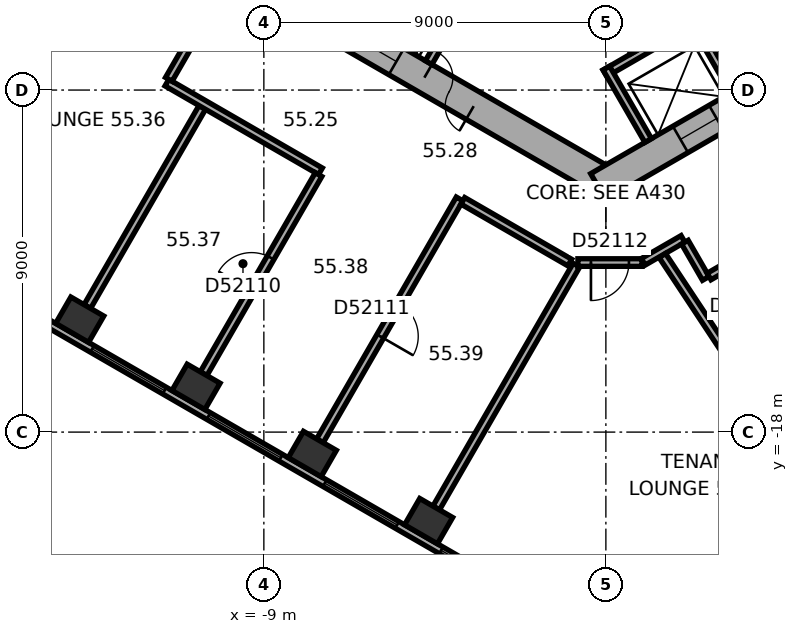
"""IFC4 building model, lengths in metres.
Left out: names, types, materials, properties, quantities, classifications, styles, units other than length and angle.
Written with IfcOpenShell. Run it as: python <this file> out.ifc"""

import sys

from ifc_helpers import new_model, si_unit, direction, frame, frame_2d, origin, origin_2d, place, context, subcontext, project, spatial, rectangle, extrude, element, fill, save


model = new_model("IFC4")
c1 = context("Model", 3, precision=1e-05, world=origin(), true_north=direction((0.0, 1.0)))
c2 = subcontext(c1, "Body", "Model", "MODEL_VIEW")
j1 = project(units=[si_unit("LENGTHUNIT", "METRE"), si_unit("PLANEANGLEUNIT", "RADIAN")], contexts=[c1])
p1 = place(None, origin())
s1 = spatial("IfcSite", under=j1, at=p1, CompositionType="ELEMENT")
p2 = place(p1, origin())
s2 = spatial("IfcBuilding", under=s1, at=p2, CompositionType="ELEMENT")
p3 = place(p2, frame((0.0, 0.0, 225.4)))
s3 = spatial("IfcBuildingStorey", under=s2, at=p3, CompositionType="ELEMENT", Elevation=225.4)
for number, where, z_axis, x_axis in (
    (1, (-13.845, -15.042, 0.0), (0.0, 0.0, 1.0), (0.866, -0.5, 0.0)),
    (2, (-10.785, -16.809, 0.0), (0.0, 0.0, 1.0), (0.866, -0.5, 0.0)),
    (3, (-7.725, -18.576, 0.0), (0.0, 0.0, 1.0), (0.866, -0.5, 0.0)),
    (4, (-4.665, -20.343, 0.0), (0.0, 0.0, 1.0), (0.866, -0.5, 0.0)),
):
    element("IfcColumn", number, at=place(p3, frame(where, z_axis=z_axis, x_axis=x_axis)), inside=s3, PredefinedType="COLUMN", context=c2, shape_type="SweptSolid", body=[
        extrude(rectangle(XDim=1.0, YDim=0.8, at=origin_2d()), origin(), (0.0, 0.0, 1.0), 3.7),
    ])
p4 = place(p3, frame((-10.1, -5.6, 0.0), z_axis=(0.0, 0.0, 1.0), x_axis=(0.866023897231, -0.500002609418, 0.0)))
e5 = element("IfcWall", 5, at=p4, inside=s3, PredefinedType="SHEAR", context=c2, shape_type="SweptSolid", body=[
    extrude(rectangle(XDim=11.894, YDim=0.8, at=frame_2d((5.947, 0.0))), origin(), (0.0, 0.0, 1.0), 3.7),
])
p5 = place(p4, frame((6.147, 0.0, 0.0)))
e6 = element("IfcOpeningElement", 6, at=p5, cuts=e5, PredefinedType="OPENING", context=c2, shape_type="SweptSolid", body=[
    extrude(rectangle(XDim=1.5, YDim=2.1, at=frame_2d((0.75, 1.05))), frame((0.0, 0.41, 0.0), z_axis=(0.0, -1.0, 0.0), x_axis=(1.0, 0.0, 0.0)), (0.0, 0.0, 1.0), 0.82),
])
p6 = place(p4, frame((1.597, 0.0, 0.0)))
e7 = element("IfcOpeningElement", 7, at=p6, cuts=e5, PredefinedType="OPENING", context=c2, shape_type="SweptSolid", body=[
    extrude(rectangle(XDim=1.1, YDim=2.1, at=frame_2d((0.55, 1.05))), frame((0.0, 0.41, 0.0), z_axis=(0.0, -1.0, 0.0), x_axis=(1.0, 0.0, 0.0)), (0.0, 0.0, 1.0), 0.82),
])
p7 = place(p4, frame((4.197, 0.0, 0.0)))
e8 = element("IfcOpeningElement", 8, at=p7, cuts=e5, PredefinedType="OPENING", context=c2, shape_type="SweptSolid", body=[
    extrude(rectangle(XDim=1.1, YDim=2.1, at=frame_2d((0.55, 1.05))), frame((0.0, 0.41, 0.0), z_axis=(0.0, -1.0, 0.0), x_axis=(1.0, 0.0, 0.0)), (0.0, 0.0, 1.0), 0.82),
])
p8 = place(p3, frame((-0.2, -11.547, 0.0), z_axis=(0.0, 0.0, 1.0), x_axis=(0.866023897231, 0.500002609418, 0.0)))
e9 = element("IfcWall", 9, at=p8, inside=s3, PredefinedType="SHEAR", context=c2, shape_type="SweptSolid", body=[
    extrude(rectangle(XDim=11.894, YDim=0.8, at=frame_2d((5.947, 0.0))), origin(), (0.0, 0.0, 1.0), 3.7),
])
p9 = place(p8, frame((2.497, 0.0, 0.0)))
e10 = element("IfcOpeningElement", 10, at=p9, cuts=e9, PredefinedType="OPENING", context=c2, shape_type="SweptSolid", body=[
    extrude(rectangle(XDim=1.1, YDim=2.1, at=frame_2d((0.55, 1.05))), frame((0.0, 0.41, 0.0), z_axis=(0.0, -1.0, 0.0), x_axis=(1.0, 0.0, 0.0)), (0.0, 0.0, 1.0), 0.82),
])
p10 = place(p8, frame((5.097, 0.0, 0.0)))
e11 = element("IfcOpeningElement", 11, at=p10, cuts=e9, PredefinedType="OPENING", context=c2, shape_type="SweptSolid", body=[
    extrude(rectangle(XDim=1.1, YDim=2.1, at=frame_2d((0.55, 1.05))), frame((0.0, 0.41, 0.0), z_axis=(0.0, -1.0, 0.0), x_axis=(1.0, 0.0, 0.0)), (0.0, 0.0, 1.0), 0.82),
])
p11 = place(p8, frame((7.697, 0.0, 0.0)))
e12 = element("IfcOpeningElement", 12, at=p11, cuts=e9, PredefinedType="OPENING", context=c2, shape_type="SweptSolid", body=[
    extrude(rectangle(XDim=1.1, YDim=2.1, at=frame_2d((0.55, 1.05))), frame((0.0, 0.41, 0.0), z_axis=(0.0, -1.0, 0.0), x_axis=(1.0, 0.0, 0.0)), (0.0, 0.0, 1.0), 0.82),
])
p12 = place(p3, frame((-17.664, -13.415, 0.0), z_axis=(0.0, 0.0, 1.0), x_axis=(0.866026555358, -0.49999800541, 0.0)))
e13 = element("IfcWall", 13, at=p12, inside=s3, PredefinedType="STANDARD", context=c2, shape_type="SweptSolid", body=[
    extrude(rectangle(XDim=18.841, YDim=0.2, at=frame_2d((9.421, 0.0))), origin(), (0.0, 0.0, 1.0), 3.7),
])
p13 = place(p12, frame((1.254, 0.0, 0.9)))
e14 = element("IfcOpeningElement", 14, at=p13, cuts=e13, PredefinedType="OPENING", context=c2, shape_type="SweptSolid", body=[
    extrude(rectangle(XDim=2.2, YDim=2.0, at=frame_2d((1.1, 1.0))), frame((0.0, 0.11, 0.0), z_axis=(0.0, -1.0, 0.0), x_axis=(1.0, 0.0, 0.0)), (0.0, 0.0, 1.0), 0.22),
])
p14 = place(p12, frame((4.788, 0.0, 0.9)))
e15 = element("IfcOpeningElement", 15, at=p14, cuts=e13, PredefinedType="OPENING", context=c2, shape_type="SweptSolid", body=[
    extrude(rectangle(XDim=2.2, YDim=2.0, at=frame_2d((1.1, 1.0))), frame((0.0, 0.11, 0.0), z_axis=(0.0, -1.0, 0.0), x_axis=(1.0, 0.0, 0.0)), (0.0, 0.0, 1.0), 0.22),
])
p15 = place(p12, frame((8.322, 0.0, 0.9)))
e16 = element("IfcOpeningElement", 16, at=p15, cuts=e13, PredefinedType="OPENING", context=c2, shape_type="SweptSolid", body=[
    extrude(rectangle(XDim=2.2, YDim=2.0, at=frame_2d((1.1, 1.0))), frame((0.0, 0.11, 0.0), z_axis=(0.0, -1.0, 0.0), x_axis=(1.0, 0.0, 0.0)), (0.0, 0.0, 1.0), 0.22),
])
p16 = place(p12, frame((11.855, 0.0, 0.9)))
e17 = element("IfcOpeningElement", 17, at=p16, cuts=e13, PredefinedType="OPENING", context=c2, shape_type="SweptSolid", body=[
    extrude(rectangle(XDim=2.2, YDim=2.0, at=frame_2d((1.1, 1.0))), frame((0.0, 0.11, 0.0), z_axis=(0.0, -1.0, 0.0), x_axis=(1.0, 0.0, 0.0)), (0.0, 0.0, 1.0), 0.22),
])
p17 = place(p12, frame((15.389, 0.0, 0.9)))
e18 = element("IfcOpeningElement", 18, at=p17, cuts=e13, PredefinedType="OPENING", context=c2, shape_type="SweptSolid", body=[
    extrude(rectangle(XDim=2.2, YDim=2.0, at=frame_2d((1.1, 1.0))), frame((0.0, 0.11, 0.0), z_axis=(0.0, -1.0, 0.0), x_axis=(1.0, 0.0, 0.0)), (0.0, 0.0, 1.0), 0.22),
])
p18 = place(p3, frame((2.739, -22.711, 0.0), z_axis=(0.0, 0.0, 1.0), x_axis=(0.833885723098, 0.551937134838, 0.0)))
e19 = element("IfcWall", 19, at=p18, inside=s3, PredefinedType="STANDARD", context=c2, shape_type="SweptSolid", body=[
    extrude(rectangle(XDim=18.841, YDim=0.2, at=frame_2d((9.421, 0.0))), origin(), (0.0, 0.0, 1.0), 3.7),
])
p19 = place(p18, frame((1.252, 0.0, 0.9)))
e20 = element("IfcOpeningElement", 20, at=p19, cuts=e19, PredefinedType="OPENING", context=c2, shape_type="SweptSolid", body=[
    extrude(rectangle(XDim=2.2, YDim=2.0, at=frame_2d((1.1, 1.0))), frame((0.0, 0.11, 0.0), z_axis=(0.0, -1.0, 0.0), x_axis=(1.0, 0.0, 0.0)), (0.0, 0.0, 1.0), 0.22),
])
p20 = place(p18, frame((4.786, 0.0, 0.9)))
e21 = element("IfcOpeningElement", 21, at=p20, cuts=e19, PredefinedType="OPENING", context=c2, shape_type="SweptSolid", body=[
    extrude(rectangle(XDim=2.2, YDim=2.0, at=frame_2d((1.1, 1.0))), frame((0.0, 0.11, 0.0), z_axis=(0.0, -1.0, 0.0), x_axis=(1.0, 0.0, 0.0)), (0.0, 0.0, 1.0), 0.22),
])
p21 = place(p18, frame((8.32, 0.0, 0.9)))
e22 = element("IfcOpeningElement", 22, at=p21, cuts=e19, PredefinedType="OPENING", context=c2, shape_type="SweptSolid", body=[
    extrude(rectangle(XDim=2.2, YDim=2.0, at=frame_2d((1.1, 1.0))), frame((0.0, 0.11, 0.0), z_axis=(0.0, -1.0, 0.0), x_axis=(1.0, 0.0, 0.0)), (0.0, 0.0, 1.0), 0.22),
])
p22 = place(p18, frame((11.854, 0.0, 0.9)))
e23 = element("IfcOpeningElement", 23, at=p22, cuts=e19, PredefinedType="OPENING", context=c2, shape_type="SweptSolid", body=[
    extrude(rectangle(XDim=2.2, YDim=2.0, at=frame_2d((1.1, 1.0))), frame((0.0, 0.11, 0.0), z_axis=(0.0, -1.0, 0.0), x_axis=(1.0, 0.0, 0.0)), (0.0, 0.0, 1.0), 0.22),
])
p23 = place(p18, frame((15.387, 0.0, 0.9)))
e24 = element("IfcOpeningElement", 24, at=p23, cuts=e19, PredefinedType="OPENING", context=c2, shape_type="SweptSolid", body=[
    extrude(rectangle(XDim=2.2, YDim=2.0, at=frame_2d((1.1, 1.0))), frame((0.0, 0.11, 0.0), z_axis=(0.0, -1.0, 0.0), x_axis=(1.0, 0.0, 0.0)), (0.0, 0.0, 1.0), 0.22),
])
p24 = place(p3, frame((-3.563, -6.372, 0.0), z_axis=(0.0, 0.0, 1.0), x_axis=(-0.499994660107, -0.866028486751, 0.0)))
e25 = element("IfcWall", 25, at=p24, inside=s3, PredefinedType="PARTITIONING", context=c2, shape_type="SweptSolid", body=[
    extrude(rectangle(XDim=2.2, YDim=0.2, at=frame_2d((1.1, 0.0))), origin(), (0.0, 0.0, 1.0), 3.42),
])
p25 = place(p3, frame((-0.024, -8.559, 0.0), z_axis=(0.0, 0.0, 1.0), x_axis=(0.866026010844, 0.49999894854, 0.0)))
e26 = element("IfcWall", 26, at=p25, inside=s3, PredefinedType="PARTITIONING", context=c2, shape_type="SweptSolid", body=[
    extrude(rectangle(XDim=8.0, YDim=0.2, at=frame_2d((4.0, 0.0))), origin(), (0.0, 0.0, 1.0), 3.42),
])
for number, where, z_axis, x_axis in (
    (27, (0.013, -8.422, 0.0), (0.0, 0.0, 1.0), (0.5, -0.866, 0.0)),
    (28, (2.264, -7.122, 0.0), (0.0, 0.0, 1.0), (0.5, -0.866, 0.0)),
):
    element("IfcWall", number, at=place(p3, frame(where, z_axis=z_axis, x_axis=x_axis)), inside=s3, PredefinedType="PARTITIONING", context=c2, shape_type="SweptSolid", body=[
        extrude(rectangle(XDim=2.2, YDim=0.2, at=frame_2d((1.1, 0.0))), origin(), (0.0, 0.0, 1.0), 3.42),
    ])
p26 = place(p3, frame((-1.558, -3.902, 0.0), z_axis=(0.0, 0.0, 1.0), x_axis=(0.499977259774, -0.866038532462, 0.0)))
e29 = element("IfcWall", 29, at=p26, inside=s3, PredefinedType="SHEAR", context=c2, shape_type="SweptSolid", body=[
    extrude(rectangle(XDim=4.7, YDim=0.3, at=frame_2d((2.35, 0.0))), origin(), (0.0, 0.0, 1.0), 3.42),
])
p27 = place(p26, frame((0.8, 0.0, 0.0)))
e30 = element("IfcOpeningElement", 30, at=p27, cuts=e29, PredefinedType="OPENING", context=c2, shape_type="SweptSolid", body=[
    extrude(rectangle(XDim=1.2, YDim=2.1, at=frame_2d((0.6, 1.05))), frame((0.0, 0.16, 0.0), z_axis=(0.0, -1.0, 0.0), x_axis=(1.0, 0.0, 0.0)), (0.0, 0.0, 1.0), 0.32),
])
p28 = place(p3, frame((-13.646, -14.696, 0.0), z_axis=(0.0, 0.0, 1.0), x_axis=(0.500006596359, 0.866021595341, 0.0)))
e31 = element("IfcWall", 31, at=p28, inside=s3, PredefinedType="PARTITIONING", context=c2, shape_type="SweptSolid", body=[
    extrude(rectangle(XDim=6.049, YDim=0.2, at=frame_2d((3.025, 0.0))), origin(), (0.0, 0.0, 1.0), 3.42),
])
p29 = place(p3, frame((-11.551, -8.805, 0.0), z_axis=(0.0, 0.0, 1.0), x_axis=(0.866038310922, -0.499977643516, 0.0)))
e32 = element("IfcWall", 32, at=p29, inside=s3, PredefinedType="PARTITIONING", context=c2, shape_type="SweptSolid", body=[
    extrude(rectangle(XDim=4.665, YDim=0.2, at=frame_2d((2.333, 0.0))), origin(), (0.0, 0.0, 1.0), 3.42),
])
p30 = place(p3, frame((-10.951, -7.765, 0.0), z_axis=(0.0, 0.0, 1.0), x_axis=(-0.499978356969, -0.866037899034, 0.0)))
e33 = element("IfcWall", 33, at=p30, inside=s3, PredefinedType="PARTITIONING", context=c2, shape_type="SweptSolid", body=[
    extrude(rectangle(XDim=1.101, YDim=0.2, at=frame_2d((0.551, 0.0))), origin(), (0.0, 0.0, 1.0), 3.42),
])
p31 = place(p3, frame((-10.585, -16.463, 0.0), z_axis=(0.0, 0.0, 1.0), x_axis=(0.499993802756, 0.866028981735, 0.0)))
e34 = element("IfcWall", 34, at=p31, inside=s3, PredefinedType="PARTITIONING", context=c2, shape_type="SweptSolid", body=[
    extrude(rectangle(XDim=6.049, YDim=0.2, at=frame_2d((3.024, 0.0))), origin(), (0.0, 0.0, 1.0), 2.87),
])
p32 = place(p31, frame((2.524, 0.0, 0.0)))
e35 = element("IfcOpeningElement", 35, at=p32, cuts=e34, PredefinedType="OPENING", context=c2, shape_type="SweptSolid", body=[
    extrude(rectangle(XDim=1.0, YDim=2.1, at=frame_2d((0.5, 1.05))), frame((0.0, 0.11, 0.0), z_axis=(0.0, -1.0, 0.0), x_axis=(1.0, 0.0, 0.0)), (0.0, 0.0, 1.0), 0.22),
])
p33 = place(p3, frame((-7.525, -18.23, 0.0), z_axis=(0.0, 0.0, 1.0), x_axis=(0.499983153418, 0.866035129944, 0.0)))
e36 = element("IfcWall", 36, at=p33, inside=s3, PredefinedType="PARTITIONING", context=c2, shape_type="SweptSolid", body=[
    extrude(rectangle(XDim=7.35, YDim=0.2, at=frame_2d((3.675, 0.0))), origin(), (0.0, 0.0, 1.0), 3.42),
])
p34 = place(p33, frame((3.175, 0.0, 0.0)))
e37 = element("IfcOpeningElement", 37, at=p34, cuts=e36, PredefinedType="OPENING", context=c2, shape_type="SweptSolid", body=[
    extrude(rectangle(XDim=1.0, YDim=2.1, at=frame_2d((0.5, 1.05))), frame((0.0, 0.11, 0.0), z_axis=(0.0, -1.0, 0.0), x_axis=(1.0, 0.0, 0.0)), (0.0, 0.0, 1.0), 0.22),
])
p35 = place(p3, frame((-4.465, -19.997, 0.0), z_axis=(0.0, 0.0, 1.0), x_axis=(0.500011802906, 0.866018589266, 0.0)))
e38 = element("IfcWall", 38, at=p35, inside=s3, PredefinedType="PARTITIONING", context=c2, shape_type="SweptSolid", body=[
    extrude(rectangle(XDim=7.377, YDim=0.2, at=frame_2d((3.688, 0.0))), origin(), (0.0, 0.0, 1.0), 3.42),
])
p36 = place(p3, frame((-3.763, -11.915, 0.0), z_axis=(0.0, 0.0, 1.0), x_axis=(0.866037915695, -0.499978328108, 0.0)))
e39 = element("IfcWall", 39, at=p36, inside=s3, PredefinedType="PARTITIONING", context=c2, shape_type="SweptSolid", body=[
    extrude(rectangle(XDim=3.249, YDim=0.2, at=frame_2d((1.625, 0.0))), origin(), (0.0, 0.0, 1.0), 3.42),
])
p37 = place(p3, frame((-0.736, -13.539, 0.0), z_axis=(0.0, 0.0, 1.0), x_axis=(1.0, 0.0, 0.0)))
e40 = element("IfcWall", 40, at=p37, inside=s3, PredefinedType="PARTITIONING", context=c2, shape_type="SweptSolid", body=[
    extrude(rectangle(XDim=1.686, YDim=0.2, at=frame_2d((0.843, 0.0))), origin(), (0.0, 0.0, 1.0), 3.42),
])
p38 = place(p37, frame((0.343, 0.0, 0.0)))
e41 = element("IfcOpeningElement", 41, at=p38, cuts=e40, PredefinedType="OPENING", context=c2, shape_type="SweptSolid", body=[
    extrude(rectangle(XDim=1.0, YDim=2.1, at=frame_2d((0.5, 1.05))), frame((0.0, 0.11, 0.0), z_axis=(0.0, -1.0, 0.0), x_axis=(1.0, 0.0, 0.0)), (0.0, 0.0, 1.0), 0.22),
])
p39 = place(p3, frame((0.985, -13.519, 0.0), z_axis=(0.0, 0.0, 1.0), x_axis=(0.866054082991, 0.499950322867, 0.0)))
e42 = element("IfcWall", 42, at=p39, inside=s3, PredefinedType="PARTITIONING", context=c2, shape_type="SweptSolid", body=[
    extrude(rectangle(XDim=1.206, YDim=0.2, at=frame_2d((0.603, 0.0))), origin(), (0.0, 0.0, 1.0), 3.42),
])
p40 = place(p3, frame((2.079, -13.003, 0.0), z_axis=(0.0, 0.0, 1.0), x_axis=(0.500074377092, -0.865982457891, 0.0)))
e43 = element("IfcWall", 43, at=p40, inside=s3, PredefinedType="PARTITIONING", context=c2, shape_type="SweptSolid", body=[
    extrude(rectangle(XDim=1.101, YDim=0.2, at=frame_2d((0.55, 0.0))), origin(), (0.0, 0.0, 1.0), 3.42),
])
p41 = place(p3, frame((2.716, -13.906, 0.0), z_axis=(0.0, 0.0, 1.0), x_axis=(0.866040290674, 0.499974214264, 0.0)))
e44 = element("IfcWall", 44, at=p41, inside=s3, PredefinedType="PARTITIONING", context=c2, shape_type="SweptSolid", body=[
    extrude(rectangle(XDim=8.702, YDim=0.2, at=frame_2d((4.351, 0.0))), origin(), (0.0, 0.0, 1.0), 3.42),
])
p42 = place(p41, frame((2.679, 0.0, 0.0)))
e45 = element("IfcOpeningElement", 45, at=p42, cuts=e44, PredefinedType="OPENING", context=c2, shape_type="SweptSolid", body=[
    extrude(rectangle(XDim=1.0, YDim=2.1, at=frame_2d((0.5, 1.05))), frame((0.0, 0.11, 0.0), z_axis=(0.0, -1.0, 0.0), x_axis=(1.0, 0.0, 0.0)), (0.0, 0.0, 1.0), 0.22),
])
p43 = place(p3, frame((5.677, -19.687, 0.0), z_axis=(0.0, 0.0, 1.0), x_axis=(-0.551936619203, 0.833886064389, 0.0)))
e46 = element("IfcWall", 46, at=p43, inside=s3, PredefinedType="PARTITIONING", context=c2, shape_type="SweptSolid", body=[
    extrude(rectangle(XDim=7.592, YDim=0.2, at=frame_2d((3.796, 0.0))), origin(), (0.0, 0.0, 1.0), 3.42),
])
p44 = place(p14, origin())
e47 = element("IfcWindow", 47, at=p44, inside=s3, PartitioningType="SINGLE_PANEL", PredefinedType="WINDOW", context=c2, shape_type="SweptSolid", body=[
    extrude(rectangle(XDim=2.2, YDim=2.0, at=frame_2d((1.1, 1.0))), frame((0.0, 0.03, 0.0), z_axis=(0.0, -1.0, 0.0), x_axis=(1.0, 0.0, 0.0)), (0.0, 0.0, 1.0), 0.06),
])
fill(e15, e47)
p45 = place(p15, origin())
e48 = element("IfcWindow", 48, at=p45, inside=s3, PartitioningType="SINGLE_PANEL", PredefinedType="WINDOW", context=c2, shape_type="SweptSolid", body=[
    extrude(rectangle(XDim=2.2, YDim=2.0, at=frame_2d((1.1, 1.0))), frame((0.0, 0.03, 0.0), z_axis=(0.0, -1.0, 0.0), x_axis=(1.0, 0.0, 0.0)), (0.0, 0.0, 1.0), 0.06),
])
fill(e16, e48)
p46 = place(p16, origin())
e49 = element("IfcWindow", 49, at=p46, inside=s3, PartitioningType="SINGLE_PANEL", PredefinedType="WINDOW", context=c2, shape_type="SweptSolid", body=[
    extrude(rectangle(XDim=2.2, YDim=2.0, at=frame_2d((1.1, 1.0))), frame((0.0, 0.03, 0.0), z_axis=(0.0, -1.0, 0.0), x_axis=(1.0, 0.0, 0.0)), (0.0, 0.0, 1.0), 0.06),
])
fill(e17, e49)
p47 = place(p17, origin())
e50 = element("IfcWindow", 50, at=p47, inside=s3, PartitioningType="SINGLE_PANEL", PredefinedType="WINDOW", context=c2, shape_type="SweptSolid", body=[
    extrude(rectangle(XDim=2.2, YDim=2.0, at=frame_2d((1.1, 1.0))), frame((0.0, 0.03, 0.0), z_axis=(0.0, -1.0, 0.0), x_axis=(1.0, 0.0, 0.0)), (0.0, 0.0, 1.0), 0.06),
])
fill(e18, e50)
p48 = place(p5, origin())
e51 = element("IfcDoor", 51, at=p48, inside=s3, OperationType="DOUBLE_DOOR_SINGLE_SWING", PredefinedType="DOOR", context=c2, shape_type="SweptSolid", body=[
    extrude(rectangle(XDim=1.5, YDim=2.1, at=frame_2d((0.75, 1.05))), frame((0.0, 0.025, 0.0), z_axis=(0.0, -1.0, 0.0), x_axis=(1.0, 0.0, 0.0)), (0.0, 0.0, 1.0), 0.05),
])
fill(e6, e51)
p49 = place(p7, origin())
e52 = element("IfcDoor", 52, at=p49, inside=s3, OperationType="DOUBLE_DOOR_SLIDING", PredefinedType="DOOR", context=c2, shape_type="SweptSolid", body=[
    extrude(rectangle(XDim=1.1, YDim=2.1, at=frame_2d((0.55, 1.05))), frame((0.0, 0.025, 0.0), z_axis=(0.0, -1.0, 0.0), x_axis=(1.0, 0.0, 0.0)), (0.0, 0.0, 1.0), 0.05),
])
fill(e8, e52)
p50 = place(p9, origin())
e53 = element("IfcDoor", 53, at=p50, inside=s3, OperationType="DOUBLE_DOOR_SLIDING", PredefinedType="DOOR", context=c2, shape_type="SweptSolid", body=[
    extrude(rectangle(XDim=1.1, YDim=2.1, at=frame_2d((0.55, 1.05))), frame((0.0, 0.025, 0.0), z_axis=(0.0, -1.0, 0.0), x_axis=(1.0, 0.0, 0.0)), (0.0, 0.0, 1.0), 0.05),
])
fill(e10, e53)
p51 = place(p32, origin())
e54 = element("IfcDoor", 54, at=p51, inside=s3, OperationType="SINGLE_SWING_LEFT", PredefinedType="DOOR", context=c2, shape_type="SweptSolid", body=[
    extrude(rectangle(XDim=1.0, YDim=2.1, at=frame_2d((0.5, 1.05))), frame((0.0, 0.025, 0.0), z_axis=(0.0, -1.0, 0.0), x_axis=(1.0, 0.0, 0.0)), (0.0, 0.0, 1.0), 0.05),
])
fill(e35, e54)
p52 = place(p34, origin())
e55 = element("IfcDoor", 55, at=p52, inside=s3, OperationType="SINGLE_SWING_LEFT", PredefinedType="DOOR", context=c2, shape_type="SweptSolid", body=[
    extrude(rectangle(XDim=1.0, YDim=2.1, at=frame_2d((0.5, 1.05))), frame((0.0, 0.025, 0.0), z_axis=(0.0, -1.0, 0.0), x_axis=(1.0, 0.0, 0.0)), (0.0, 0.0, 1.0), 0.05),
])
fill(e37, e55)
p53 = place(p38, origin())
e56 = element("IfcDoor", 56, at=p53, inside=s3, OperationType="SINGLE_SWING_LEFT", PredefinedType="DOOR", context=c2, shape_type="SweptSolid", body=[
    extrude(rectangle(XDim=1.0, YDim=2.1, at=frame_2d((0.5, 1.05))), frame((0.0, 0.025, 0.0), z_axis=(0.0, -1.0, 0.0), x_axis=(1.0, 0.0, 0.0)), (0.0, 0.0, 1.0), 0.05),
])
fill(e41, e56)
save(model, sys.argv[1])
